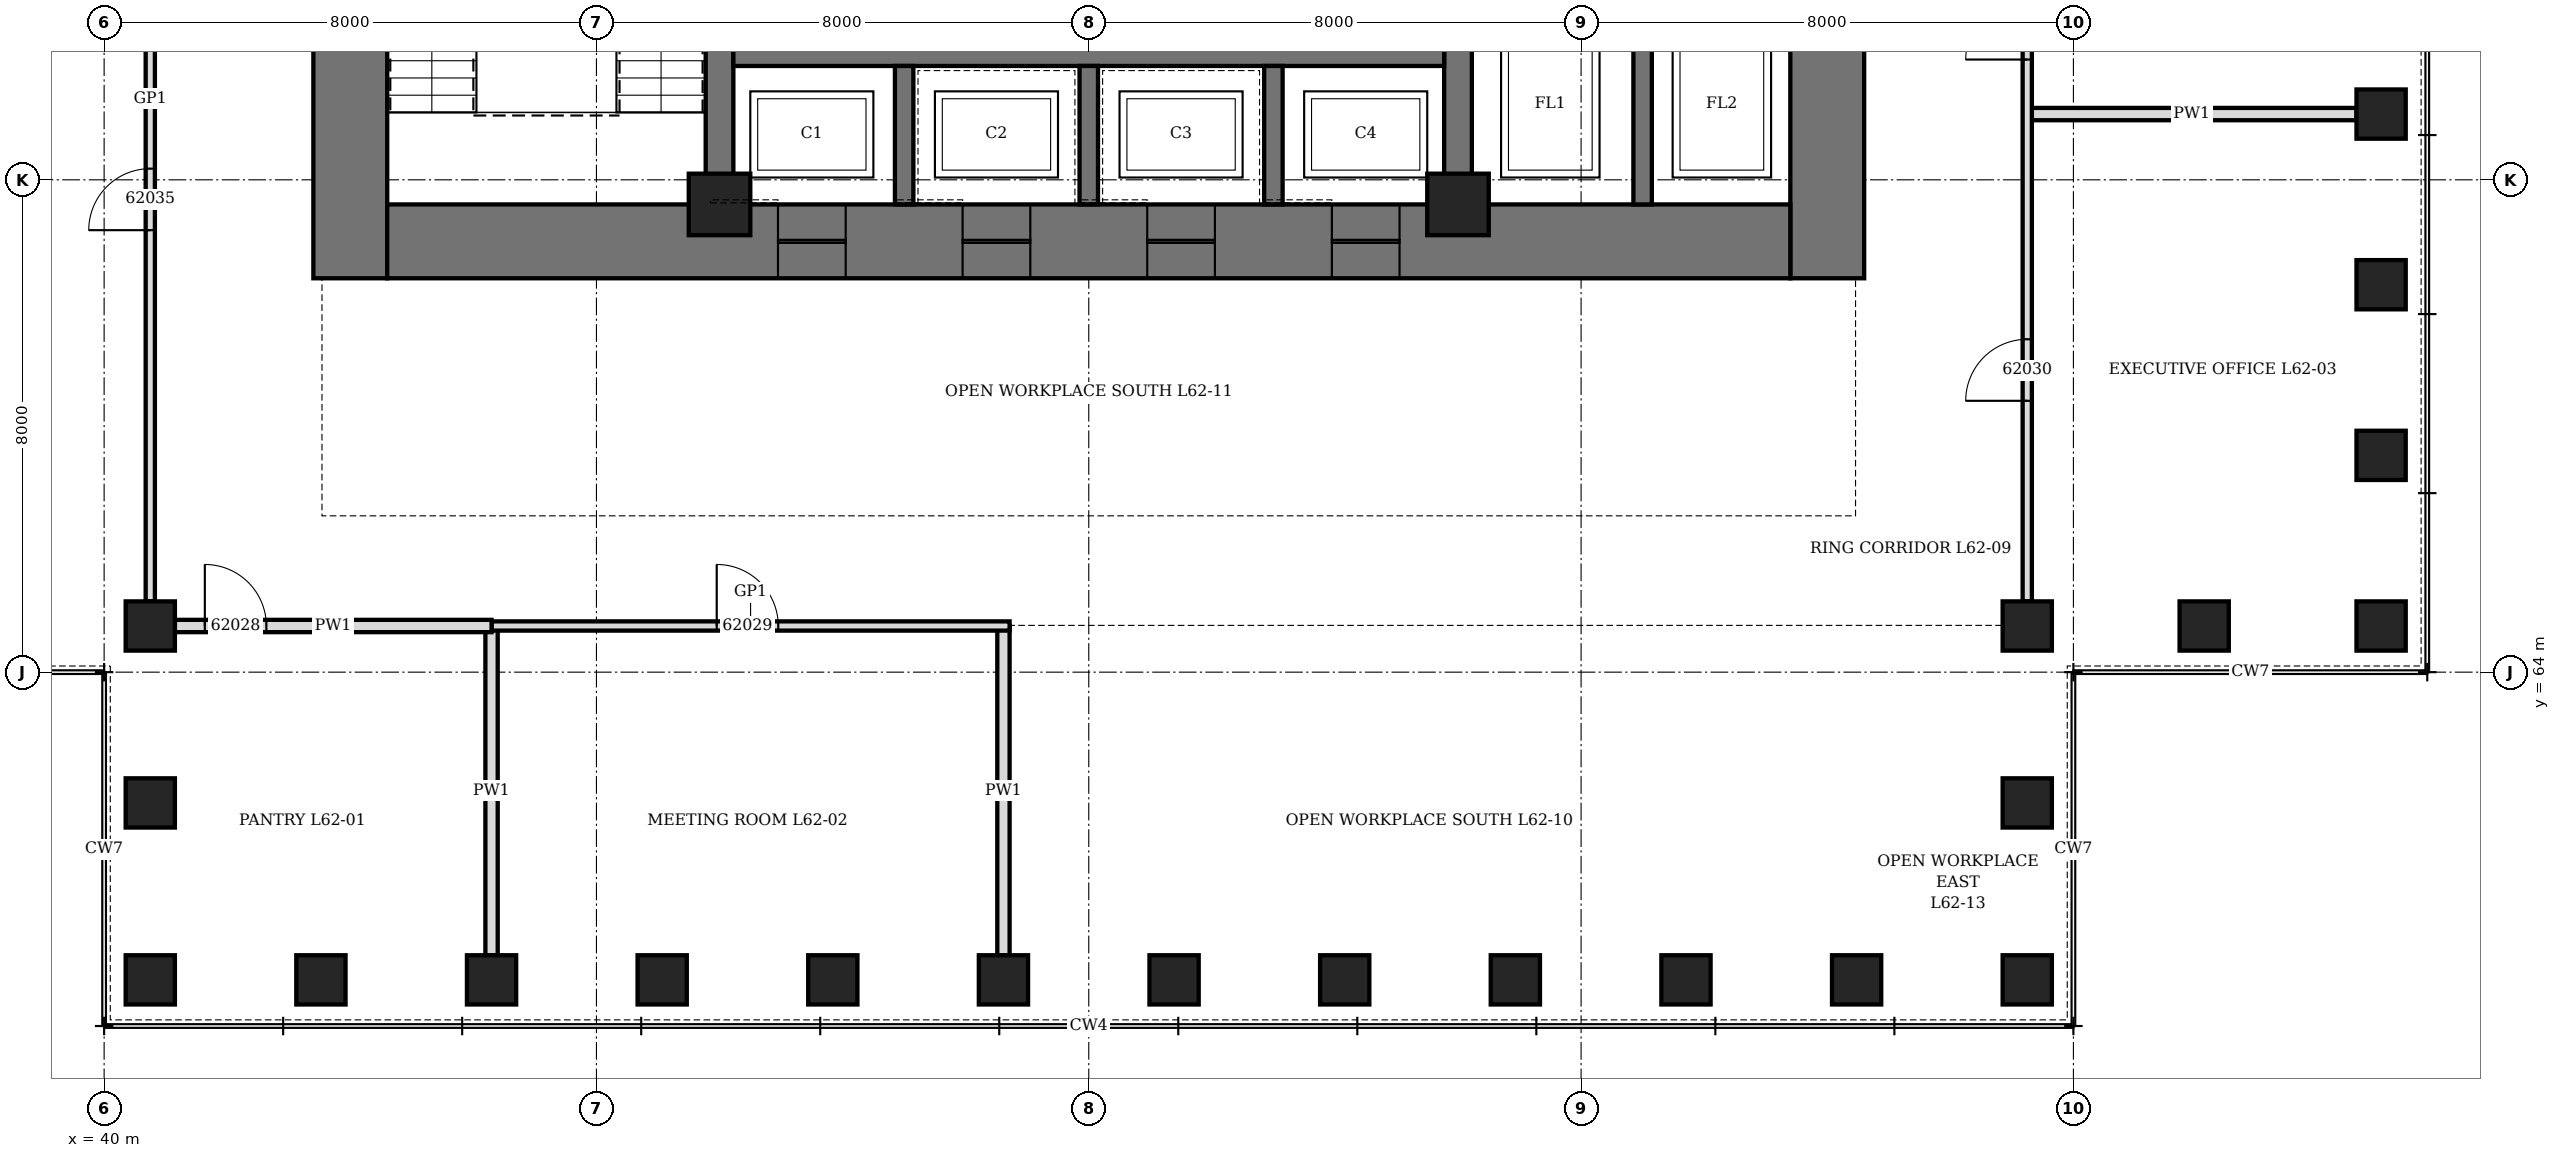
"""IFC4 building model, lengths in metres.
Left out: names, types, materials, properties, quantities, classifications, styles, units other than length and angle.
Written with IfcOpenShell. Run it as: python <this file> out.ifc"""

import sys

from ifc_helpers import new_model, si_unit, direction, frame, frame_2d, origin, origin_2d, place, context, subcontext, project, spatial, rectangle, hollow_rectangle, extrude, element, fill, save


model = new_model("IFC4")
c1 = context("Model", 3, precision=1e-05, world=origin(), true_north=direction((0.0, 1.0)))
c2 = subcontext(c1, "Body", "Model", "MODEL_VIEW")
j1 = project(units=[si_unit("LENGTHUNIT", "METRE"), si_unit("PLANEANGLEUNIT", "RADIAN")], contexts=[c1])
p1 = place(None, origin())
s1 = spatial("IfcSite", under=j1, at=p1, CompositionType="ELEMENT")
p2 = place(p1, origin())
s2 = spatial("IfcBuilding", under=s1, at=p2, CompositionType="ELEMENT")
p3 = place(p2, frame((0.0, 0.0, 275.5)))
s3 = spatial("IfcBuildingStorey", under=s2, at=p3, CompositionType="ELEMENT", Elevation=275.5)
for number, where, z_axis, x_axis in (
    (1, (40.75, 59.0, 0.0), (0.0, 0.0, 1.0), (1.0, 0.0, 0.0)),
    (2, (43.523, 59.0, 0.0), (0.0, 0.0, 1.0), (1.0, 0.0, 0.0)),
    (3, (46.295, 59.0, 0.0), (0.0, 0.0, 1.0), (1.0, 0.0, 0.0)),
    (4, (49.068, 59.0, 0.0), (0.0, 0.0, 1.0), (1.0, 0.0, 0.0)),
    (5, (51.841, 59.0, 0.0), (0.0, 0.0, 1.0), (1.0, 0.0, 0.0)),
    (6, (54.614, 59.0, 0.0), (0.0, 0.0, 1.0), (1.0, 0.0, 0.0)),
    (7, (57.386, 59.0, 0.0), (0.0, 0.0, 1.0), (1.0, 0.0, 0.0)),
    (8, (60.159, 59.0, 0.0), (0.0, 0.0, 1.0), (1.0, 0.0, 0.0)),
    (9, (62.932, 59.0, 0.0), (0.0, 0.0, 1.0), (1.0, 0.0, 0.0)),
    (10, (65.705, 59.0, 0.0), (0.0, 0.0, 1.0), (1.0, 0.0, 0.0)),
    (11, (68.477, 59.0, 0.0), (0.0, 0.0, 1.0), (1.0, 0.0, 0.0)),
    (12, (71.25, 59.0, 0.0), (0.0, 0.0, 1.0), (0.0, 1.0, 0.0)),
    (13, (71.25, 61.875, 0.0), (0.0, 0.0, 1.0), (0.0, 1.0, 0.0)),
    (14, (71.25, 64.75, 0.0), (0.0, 0.0, 1.0), (1.0, 0.0, 0.0)),
    (15, (74.125, 64.75, 0.0), (0.0, 0.0, 1.0), (1.0, 0.0, 0.0)),
    (16, (77.0, 64.75, 0.0), (0.0, 0.0, 1.0), (0.0, 1.0, 0.0)),
    (17, (77.0, 67.523, 0.0), (0.0, 0.0, 1.0), (0.0, 1.0, 0.0)),
    (18, (77.0, 70.295, 0.0), (0.0, 0.0, 1.0), (0.0, 1.0, 0.0)),
    (19, (77.0, 73.068, 0.0), (0.0, 0.0, 1.0), (0.0, 1.0, 0.0)),
    (20, (40.75, 64.75, 0.0), (0.0, 0.0, 1.0), (0.0, 1.0, 0.0)),
    (21, (40.75, 61.875, 0.0), (0.0, 0.0, 1.0), (0.0, 1.0, 0.0)),
):
    element("IfcColumn", number, at=place(p3, frame(where, z_axis=z_axis, x_axis=x_axis)), inside=s3, PredefinedType="COLUMN", context=c2, shape_type="SweptSolid", body=[
        extrude(hollow_rectangle(XDim=0.8, YDim=0.8, WallThickness=0.1, at=origin_2d()), origin(), (0.0, 0.0, 1.0), 3.95),
    ])
p4 = place(p3, frame((44.0, 70.4, 0.0), z_axis=(0.0, 0.0, 1.0), x_axis=(0.0, 1.0, 0.0)))
e22 = element("IfcWall", 22, at=p4, inside=s3, PredefinedType="SHEAR", context=c2, shape_type="SweptSolid", body=[
    extrude(rectangle(XDim=19.2, YDim=1.2, at=frame_2d((9.6, 0.0))), origin(), (0.0, 0.0, 1.0), 4.2),
])
p5 = place(p4, frame((8.6, 0.0, 0.0)))
e23 = element("IfcOpeningElement", 23, at=p5, cuts=e22, PredefinedType="OPENING", context=c2, shape_type="SweptSolid", body=[
    extrude(rectangle(XDim=2.0, YDim=2.4, at=frame_2d((1.0, 1.2))), frame((0.0, 0.61, 0.0), z_axis=(0.0, -1.0, 0.0), x_axis=(1.0, 0.0, 0.0)), (0.0, 0.0, 1.0), 1.22),
])
p6 = place(p3, frame((68.0, 70.4, 0.0), z_axis=(0.0, 0.0, 1.0), x_axis=(0.0, 1.0, 0.0)))
e24 = element("IfcWall", 24, at=p6, inside=s3, PredefinedType="SHEAR", context=c2, shape_type="SweptSolid", body=[
    extrude(rectangle(XDim=19.2, YDim=1.2, at=frame_2d((9.6, 0.0))), origin(), (0.0, 0.0, 1.0), 4.2),
])
p7 = place(p6, frame((8.6, 0.0, 0.0)))
e25 = element("IfcOpeningElement", 25, at=p7, cuts=e24, PredefinedType="OPENING", context=c2, shape_type="SweptSolid", body=[
    extrude(rectangle(XDim=2.0, YDim=2.4, at=frame_2d((1.0, 1.2))), frame((0.0, 0.61, 0.0), z_axis=(0.0, -1.0, 0.0), x_axis=(1.0, 0.0, 0.0)), (0.0, 0.0, 1.0), 1.22),
])
p8 = place(p3, frame((44.6, 71.0, 0.0), z_axis=(0.0, 0.0, 1.0), x_axis=(1.0, 0.0, 0.0)))
e26 = element("IfcWall", 26, at=p8, inside=s3, PredefinedType="SHEAR", context=c2, shape_type="SweptSolid", body=[
    extrude(rectangle(XDim=22.8, YDim=1.2, at=frame_2d((11.4, 0.0))), origin(), (0.0, 0.0, 1.0), 4.2),
])
p9 = place(p8, frame((6.35, 0.0, 0.0)))
e27 = element("IfcOpeningElement", 27, at=p9, cuts=e26, PredefinedType="OPENING", context=c2, shape_type="SweptSolid", body=[
    extrude(rectangle(XDim=1.1, YDim=2.2, at=frame_2d((0.55, 1.1))), frame((0.0, 0.61, 0.0), z_axis=(0.0, -1.0, 0.0), x_axis=(1.0, 0.0, 0.0)), (0.0, 0.0, 1.0), 1.22),
])
p10 = place(p8, frame((9.35, 0.0, 0.0)))
e28 = element("IfcOpeningElement", 28, at=p10, cuts=e26, PredefinedType="OPENING", context=c2, shape_type="SweptSolid", body=[
    extrude(rectangle(XDim=1.1, YDim=2.2, at=frame_2d((0.55, 1.1))), frame((0.0, 0.61, 0.0), z_axis=(0.0, -1.0, 0.0), x_axis=(1.0, 0.0, 0.0)), (0.0, 0.0, 1.0), 1.22),
])
p11 = place(p8, frame((12.35, 0.0, 0.0)))
e29 = element("IfcOpeningElement", 29, at=p11, cuts=e26, PredefinedType="OPENING", context=c2, shape_type="SweptSolid", body=[
    extrude(rectangle(XDim=1.1, YDim=2.2, at=frame_2d((0.55, 1.1))), frame((0.0, 0.61, 0.0), z_axis=(0.0, -1.0, 0.0), x_axis=(1.0, 0.0, 0.0)), (0.0, 0.0, 1.0), 1.22),
])
p12 = place(p8, frame((15.35, 0.0, 0.0)))
e30 = element("IfcOpeningElement", 30, at=p12, cuts=e26, PredefinedType="OPENING", context=c2, shape_type="SweptSolid", body=[
    extrude(rectangle(XDim=1.1, YDim=2.2, at=frame_2d((0.55, 1.1))), frame((0.0, 0.61, 0.0), z_axis=(0.0, -1.0, 0.0), x_axis=(1.0, 0.0, 0.0)), (0.0, 0.0, 1.0), 1.22),
])
p13 = place(p3, frame((50.0, 71.6, 0.0), z_axis=(0.0, 0.0, 1.0), x_axis=(0.0, 1.0, 0.0)))
e31 = element("IfcWall", 31, at=p13, inside=s3, PredefinedType="SHEAR", context=c2, shape_type="SweptSolid", body=[
    extrude(rectangle(XDim=16.8, YDim=0.45, at=frame_2d((8.4, 0.0))), origin(), (0.0, 0.0, 1.0), 4.2),
])
p14 = place(p13, frame((7.5, 0.0, 0.0)))
e32 = element("IfcOpeningElement", 32, at=p14, cuts=e31, PredefinedType="OPENING", context=c2, shape_type="SweptSolid", body=[
    extrude(rectangle(XDim=1.8, YDim=2.4, at=frame_2d((0.9, 1.2))), frame((0.0, 0.235, 0.0), z_axis=(0.0, -1.0, 0.0), x_axis=(1.0, 0.0, 0.0)), (0.0, 0.0, 1.0), 0.47),
])
p15 = place(p3, frame((62.0, 71.6, 0.0), z_axis=(0.0, 0.0, 1.0), x_axis=(0.0, 1.0, 0.0)))
e33 = element("IfcWall", 33, at=p15, inside=s3, PredefinedType="SHEAR", context=c2, shape_type="SweptSolid", body=[
    extrude(rectangle(XDim=16.8, YDim=0.45, at=frame_2d((8.4, 0.0))), origin(), (0.0, 0.0, 1.0), 4.2),
])
p16 = place(p15, frame((7.5, 0.0, 0.0)))
e34 = element("IfcOpeningElement", 34, at=p16, cuts=e33, PredefinedType="OPENING", context=c2, shape_type="SweptSolid", body=[
    extrude(rectangle(XDim=1.8, YDim=2.4, at=frame_2d((0.9, 1.2))), frame((0.0, 0.235, 0.0), z_axis=(0.0, -1.0, 0.0), x_axis=(1.0, 0.0, 0.0)), (0.0, 0.0, 1.0), 0.47),
])
p17 = place(p3, frame((50.225, 74.0, 0.0), z_axis=(0.0, 0.0, 1.0), x_axis=(1.0, 0.0, 0.0)))
e35 = element("IfcWall", 35, at=p17, inside=s3, PredefinedType="SHEAR", context=c2, shape_type="SweptSolid", body=[
    extrude(rectangle(XDim=11.55, YDim=0.3, at=frame_2d((5.775, 0.0))), origin(), (0.0, 0.0, 1.0), 4.2),
])
for number, where, z_axis, x_axis in (
    (36, (53.0, 71.6, 0.0), (0.0, 0.0, 1.0), (0.0, 1.0, 0.0)),
    (37, (56.0, 71.6, 0.0), (0.0, 0.0, 1.0), (0.0, 1.0, 0.0)),
    (38, (59.0, 71.6, 0.0), (0.0, 0.0, 1.0), (0.0, 1.0, 0.0)),
):
    element("IfcWall", number, at=place(p3, frame(where, z_axis=z_axis, x_axis=x_axis)), inside=s3, PredefinedType="SHEAR", context=c2, shape_type="SweptSolid", body=[
        extrude(rectangle(XDim=2.25, YDim=0.3, at=frame_2d((1.125, 0.0))), origin(), (0.0, 0.0, 1.0), 4.2),
    ])
p18 = place(p3, frame((65.0, 71.6, 0.0), z_axis=(0.0, 0.0, 1.0), x_axis=(0.0, 1.0, 0.0)))
e39 = element("IfcWall", 39, at=p18, inside=s3, PredefinedType="SHEAR", context=c2, shape_type="SweptSolid", body=[
    extrude(rectangle(XDim=3.175, YDim=0.3, at=frame_2d((1.587, 0.0))), origin(), (0.0, 0.0, 1.0), 4.2),
])
for number, where, z_axis, x_axis in (
    (40, (50.0, 71.6, 0.0), (0.0, 0.0, 1.0), (1.0, 0.0, 0.0)),
    (41, (62.0, 71.6, 0.0), (0.0, 0.0, 1.0), (1.0, 0.0, 0.0)),
):
    element("IfcColumn", number, at=place(p3, frame(where, z_axis=z_axis, x_axis=x_axis)), inside=s3, PredefinedType="COLUMN", context=c2, shape_type="SweptSolid", body=[
        extrude(hollow_rectangle(XDim=1.0, YDim=1.0, WallThickness=0.15, at=origin_2d()), origin(), (0.0, 0.0, 1.0), 4.2),
    ])
for number, where, z_axis, x_axis in (
    (42, (46.295, 59.4, 0.0), (0.0, 0.0, 1.0), (0.0, 1.0, 0.0)),
    (43, (54.614, 59.4, 0.0), (0.0, 0.0, 1.0), (0.0, 1.0, 0.0)),
    (44, (71.25, 73.068, 0.0), (0.0, 0.0, 1.0), (1.0, 0.0, 0.0)),
):
    element("IfcWall", number, at=place(p3, frame(where, z_axis=z_axis, x_axis=x_axis)), inside=s3, PredefinedType="PARTITIONING", context=c2, shape_type="SweptSolid", body=[
        extrude(rectangle(XDim=5.35, YDim=0.2, at=frame_2d((2.675, 0.0))), origin(), (0.0, 0.0, 1.0), 1.95),
    ])
p19 = place(p3, frame((46.295, 64.75, 0.0), z_axis=(0.0, 0.0, 1.0), x_axis=(1.0, 0.0, 0.0)))
e45 = element("IfcWall", 45, at=p19, inside=s3, PredefinedType="PARTITIONING", context=c2, shape_type="SweptSolid", body=[
    extrude(rectangle(XDim=8.418, YDim=0.15, at=frame_2d((4.209, 0.0))), origin(), (0.0, 0.0, 1.0), 3.95),
])
p20 = place(p19, frame((3.659, 0.0, 0.0)))
e46 = element("IfcOpeningElement", 46, at=p20, cuts=e45, PredefinedType="OPENING", context=c2, shape_type="SweptSolid", body=[
    extrude(rectangle(XDim=1.0, YDim=2.4, at=frame_2d((0.5, 1.2))), frame((0.0, 0.085, 0.0), z_axis=(0.0, -1.0, 0.0), x_axis=(1.0, 0.0, 0.0)), (0.0, 0.0, 1.0), 0.17),
])
p21 = place(p3, frame((41.15, 64.75, 0.0), z_axis=(0.0, 0.0, 1.0), x_axis=(1.0, 0.0, 0.0)))
e47 = element("IfcWall", 47, at=p21, inside=s3, PredefinedType="PARTITIONING", context=c2, shape_type="SweptSolid", body=[
    extrude(rectangle(XDim=5.146, YDim=0.2, at=frame_2d((2.573, 0.0))), origin(), (0.0, 0.0, 1.0), 2.45),
])
p22 = place(p21, frame((0.486, 0.0, 0.0)))
e48 = element("IfcOpeningElement", 48, at=p22, cuts=e47, PredefinedType="OPENING", context=c2, shape_type="SweptSolid", body=[
    extrude(rectangle(XDim=1.0, YDim=2.1, at=frame_2d((0.5, 1.05))), frame((0.0, 0.11, 0.0), z_axis=(0.0, -1.0, 0.0), x_axis=(1.0, 0.0, 0.0)), (0.0, 0.0, 1.0), 0.22),
])
p23 = place(p3, frame((40.75, 65.15, 0.0), z_axis=(0.0, 0.0, 1.0), x_axis=(0.0, 1.0, 0.0)))
e49 = element("IfcWall", 49, at=p23, inside=s3, PredefinedType="PARTITIONING", context=c2, shape_type="SweptSolid", body=[
    extrude(rectangle(XDim=16.336, YDim=0.15, at=frame_2d((8.168, 0.0))), origin(), (0.0, 0.0, 1.0), 2.45),
])
p24 = place(p23, frame((6.032, 0.0, 0.0)))
e50 = element("IfcOpeningElement", 50, at=p24, cuts=e49, PredefinedType="OPENING", context=c2, shape_type="SweptSolid", body=[
    extrude(rectangle(XDim=1.0, YDim=2.4, at=frame_2d((0.5, 1.2))), frame((0.0, 0.085, 0.0), z_axis=(0.0, -1.0, 0.0), x_axis=(1.0, 0.0, 0.0)), (0.0, 0.0, 1.0), 0.17),
])
p25 = place(p3, frame((71.25, 65.15, 0.0), z_axis=(0.0, 0.0, 1.0), x_axis=(0.0, 1.0, 0.0)))
e51 = element("IfcWall", 51, at=p25, inside=s3, PredefinedType="PARTITIONING", context=c2, shape_type="SweptSolid", body=[
    extrude(rectangle(XDim=19.109, YDim=0.15, at=frame_2d((9.555, 0.0))), origin(), (0.0, 0.0, 1.0), 2.45),
])
p26 = place(p25, frame((3.259, 0.0, 0.0)))
e52 = element("IfcOpeningElement", 52, at=p26, cuts=e51, PredefinedType="OPENING", context=c2, shape_type="SweptSolid", body=[
    extrude(rectangle(XDim=1.0, YDim=2.1, at=frame_2d((0.5, 1.05))), frame((0.0, 0.085, 0.0), z_axis=(0.0, -1.0, 0.0), x_axis=(1.0, 0.0, 0.0)), (0.0, 0.0, 1.0), 0.17),
])
p27 = place(p25, frame((8.804, 0.0, 0.0)))
e53 = element("IfcOpeningElement", 53, at=p27, cuts=e51, PredefinedType="OPENING", context=c2, shape_type="SweptSolid", body=[
    extrude(rectangle(XDim=1.0, YDim=2.1, at=frame_2d((0.5, 1.05))), frame((0.0, 0.085, 0.0), z_axis=(0.0, -1.0, 0.0), x_axis=(1.0, 0.0, 0.0)), (0.0, 0.0, 1.0), 0.17),
])
p28 = place(p25, frame((14.35, 0.0, 0.0)))
e54 = element("IfcOpeningElement", 54, at=p28, cuts=e51, PredefinedType="OPENING", context=c2, shape_type="SweptSolid", body=[
    extrude(rectangle(XDim=1.0, YDim=2.1, at=frame_2d((0.5, 1.05))), frame((0.0, 0.085, 0.0), z_axis=(0.0, -1.0, 0.0), x_axis=(1.0, 0.0, 0.0)), (0.0, 0.0, 1.0), 0.17),
])
p29 = place(p9, origin())
e55 = element("IfcDoor", 55, at=p29, inside=s3, OperationType="SLIDING_TO_LEFT", PredefinedType="DOOR", context=c2, shape_type="SweptSolid", body=[
    extrude(rectangle(XDim=1.1, YDim=2.2, at=frame_2d((0.55, 1.1))), frame((0.0, 0.35, 0.0), z_axis=(0.0, -1.0, 0.0), x_axis=(1.0, 0.0, 0.0)), (0.0, 0.0, 1.0), 0.7),
])
fill(e27, e55)
p30 = place(p10, origin())
e56 = element("IfcDoor", 56, at=p30, inside=s3, OperationType="SLIDING_TO_LEFT", PredefinedType="DOOR", context=c2, shape_type="SweptSolid", body=[
    extrude(rectangle(XDim=1.1, YDim=2.2, at=frame_2d((0.55, 1.1))), frame((0.0, 0.35, 0.0), z_axis=(0.0, -1.0, 0.0), x_axis=(1.0, 0.0, 0.0)), (0.0, 0.0, 1.0), 0.7),
])
fill(e28, e56)
p31 = place(p11, origin())
e57 = element("IfcDoor", 57, at=p31, inside=s3, OperationType="SLIDING_TO_LEFT", PredefinedType="DOOR", context=c2, shape_type="SweptSolid", body=[
    extrude(rectangle(XDim=1.1, YDim=2.2, at=frame_2d((0.55, 1.1))), frame((0.0, 0.35, 0.0), z_axis=(0.0, -1.0, 0.0), x_axis=(1.0, 0.0, 0.0)), (0.0, 0.0, 1.0), 0.7),
])
fill(e29, e57)
p32 = place(p12, origin())
e58 = element("IfcDoor", 58, at=p32, inside=s3, OperationType="SLIDING_TO_LEFT", PredefinedType="DOOR", context=c2, shape_type="SweptSolid", body=[
    extrude(rectangle(XDim=1.1, YDim=2.2, at=frame_2d((0.55, 1.1))), frame((0.0, 0.35, 0.0), z_axis=(0.0, -1.0, 0.0), x_axis=(1.0, 0.0, 0.0)), (0.0, 0.0, 1.0), 0.7),
])
fill(e30, e58)
p33 = place(p22, origin())
e59 = element("IfcDoor", 59, at=p33, inside=s3, OperationType="SINGLE_SWING_LEFT", PredefinedType="DOOR", context=c2, shape_type="SweptSolid", body=[
    extrude(rectangle(XDim=1.0, YDim=2.1, at=frame_2d((0.5, 1.05))), frame((0.0, 0.1, 0.0), z_axis=(0.0, -1.0, 0.0), x_axis=(1.0, 0.0, 0.0)), (0.0, 0.0, 1.0), 0.199),
])
fill(e48, e59)
p34 = place(p20, origin())
e60 = element("IfcDoor", 60, at=p34, inside=s3, OperationType="SINGLE_SWING_RIGHT", PredefinedType="DOOR", context=c2, shape_type="SweptSolid", body=[
    extrude(rectangle(XDim=1.0, YDim=2.4, at=frame_2d((0.5, 1.2))), frame((0.0, 0.075, 0.0), z_axis=(0.0, -1.0, 0.0), x_axis=(1.0, 0.0, 0.0)), (0.0, 0.0, 1.0), 0.149),
])
fill(e46, e60)
p35 = place(p26, origin())
e61 = element("IfcDoor", 61, at=p35, inside=s3, OperationType="SINGLE_SWING_LEFT", PredefinedType="DOOR", context=c2, shape_type="SweptSolid", body=[
    extrude(rectangle(XDim=1.0, YDim=2.1, at=frame_2d((0.5, 1.05))), frame((0.0, 0.075, 0.0), z_axis=(0.0, -1.0, 0.0), x_axis=(1.0, 0.0, 0.0)), (0.0, 0.0, 1.0), 0.149),
])
fill(e52, e61)
p36 = place(p27, origin())
e62 = element("IfcDoor", 62, at=p36, inside=s3, OperationType="SINGLE_SWING_LEFT", PredefinedType="DOOR", context=c2, shape_type="SweptSolid", body=[
    extrude(rectangle(XDim=1.0, YDim=2.1, at=frame_2d((0.5, 1.05))), frame((0.0, 0.075, 0.0), z_axis=(0.0, -1.0, 0.0), x_axis=(1.0, 0.0, 0.0)), (0.0, 0.0, 1.0), 0.149),
])
fill(e53, e62)
p37 = place(p24, origin())
e63 = element("IfcDoor", 63, at=p37, inside=s3, OperationType="SINGLE_SWING_RIGHT", PredefinedType="DOOR", context=c2, shape_type="SweptSolid", body=[
    extrude(rectangle(XDim=1.0, YDim=2.4, at=frame_2d((0.5, 1.2))), frame((0.0, 0.075, 0.0), z_axis=(0.0, -1.0, 0.0), x_axis=(1.0, 0.0, 0.0)), (0.0, 0.0, 1.0), 0.149),
])
fill(e50, e63)
save(model, sys.argv[1])
